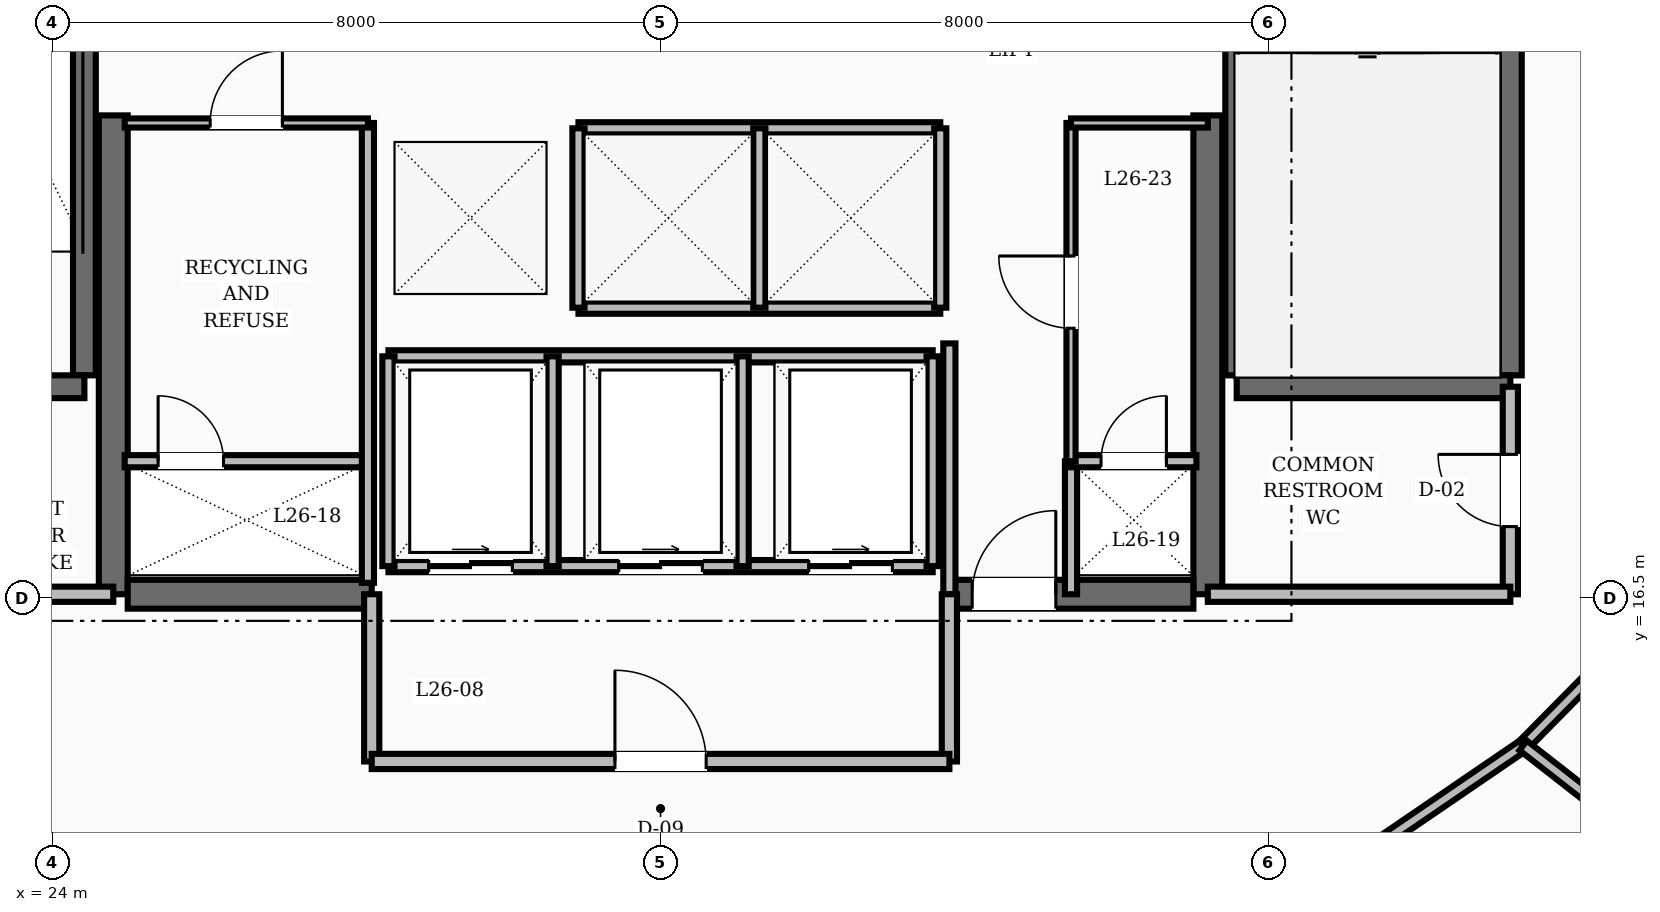
"""IFC4 building model, lengths in metres.
Left out: names, types, materials, properties, quantities, classifications, styles, units other than length and angle.
Written with IfcOpenShell. Run it as: python <this file> out.ifc"""

import sys

from ifc_helpers import new_model, si_unit, direction, frame, frame_2d, origin, place, context, subcontext, project, spatial, rectangle, extrude, element, fill, save


model = new_model("IFC4")
c1 = context("Model", 3, precision=1e-05, world=origin(), true_north=direction((0.0, 1.0)))
c2 = subcontext(c1, "Body", "Model", "MODEL_VIEW")
j1 = project(units=[si_unit("LENGTHUNIT", "METRE"), si_unit("PLANEANGLEUNIT", "RADIAN")], contexts=[c1])
p1 = place(None, origin())
s1 = spatial("IfcSite", under=j1, at=p1, CompositionType="ELEMENT")
p2 = place(p1, origin())
s2 = spatial("IfcBuilding", under=s1, at=p2, CompositionType="ELEMENT")
p3 = place(p2, frame((0.0, 0.0, 102.4)))
s3 = spatial("IfcBuildingStorey", under=s2, at=p3, CompositionType="ELEMENT", Elevation=102.4)
for number, where, z_axis, x_axis in (
    (1, (24.8, 16.55, 0.0), (0.0, 0.0, 1.0), (0.0, 1.0, 0.0)),
    (2, (39.2, 16.55, 0.0), (0.0, 0.0, 1.0), (0.0, 1.0, 0.0)),
):
    element("IfcWall", number, at=place(p3, frame(where, z_axis=z_axis, x_axis=x_axis)), inside=s3, PredefinedType="SHEAR", context=c2, shape_type="SweptSolid", body=[
        extrude(rectangle(XDim=6.3, YDim=0.38, at=frame_2d((3.15, 0.0))), origin(), (0.0, 0.0, 1.0), 3.6),
    ])
p4 = place(p3, frame((24.99, 16.55, 0.0), z_axis=(0.0, 0.0, 1.0), x_axis=(1.0, 0.0, 0.0)))
e3 = element("IfcWall", 3, at=p4, inside=s3, PredefinedType="SHEAR", context=c2, shape_type="SweptSolid", body=[
    extrude(rectangle(XDim=3.21, YDim=0.38, at=frame_2d((1.605, 0.0))), origin(), (0.0, 0.0, 1.0), 3.6),
])
p5 = place(p3, frame((35.8, 16.55, 0.0), z_axis=(0.0, 0.0, 1.0), x_axis=(1.0, 0.0, 0.0)))
e4 = element("IfcWall", 4, at=p5, inside=s3, PredefinedType="SHEAR", context=c2, shape_type="SweptSolid", body=[
    extrude(rectangle(XDim=3.21, YDim=0.38, at=frame_2d((1.605, 0.0))), origin(), (0.0, 0.0, 1.0), 3.6),
])
p6 = place(p5, frame((0.3, 0.0, 0.0)))
e5 = element("IfcOpeningElement", 5, at=p6, cuts=e4, PredefinedType="OPENING", context=c2, shape_type="SweptSolid", body=[
    extrude(rectangle(XDim=1.1, YDim=2.1, at=frame_2d((0.55, 1.05))), frame((0.0, 0.2, 0.0), z_axis=(0.0, -1.0, 0.0), x_axis=(1.0, 0.0, 0.0)), (0.0, 0.0, 1.0), 0.4),
])
p7 = place(p3, frame((24.42, 19.43, 0.0), z_axis=(0.0, 0.0, 1.0), x_axis=(0.0, 1.0, 0.0)))
e6 = element("IfcWall", 6, at=p7, inside=s3, PredefinedType="SHEAR", context=c2, shape_type="SweptSolid", body=[
    extrude(rectangle(XDim=8.74, YDim=0.3, at=frame_2d((4.37, 0.0))), origin(), (0.0, 0.0, 1.0), 3.6),
])
p8 = place(p3, frame((20.82, 19.28, 0.0), z_axis=(0.0, 0.0, 1.0), x_axis=(1.0, 0.0, 0.0)))
e7 = element("IfcWall", 7, at=p8, inside=s3, PredefinedType="SHEAR", context=c2, shape_type="SweptSolid", body=[
    extrude(rectangle(XDim=3.6, YDim=0.3, at=frame_2d((1.8, 0.0))), origin(), (0.0, 0.0, 1.0), 3.6),
])
p9 = place(p8, frame((1.3, 0.0, 0.0)))
e8 = element("IfcOpeningElement", 8, at=p9, cuts=e7, PredefinedType="OPENING", context=c2, shape_type="SweptSolid", body=[
    extrude(rectangle(XDim=1.1, YDim=2.1, at=frame_2d((0.55, 1.05))), frame((0.0, 0.16, 0.0), z_axis=(0.0, -1.0, 0.0), x_axis=(1.0, 0.0, 0.0)), (0.0, 0.0, 1.0), 0.32),
])
for number, where, z_axis, x_axis in (
    (9, (43.18, 19.43, 0.0), (0.0, 0.0, 1.0), (0.0, 1.0, 0.0)),
    (10, (39.58, 19.43, 0.0), (0.0, 0.0, 1.0), (0.0, 1.0, 0.0)),
):
    element("IfcWall", number, at=place(p3, frame(where, z_axis=z_axis, x_axis=x_axis)), inside=s3, PredefinedType="SHEAR", context=c2, shape_type="SweptSolid", body=[
        extrude(rectangle(XDim=8.74, YDim=0.3, at=frame_2d((4.37, 0.0))), origin(), (0.0, 0.0, 1.0), 3.6),
    ])
p10 = place(p3, frame((39.58, 19.28, 0.0), z_axis=(0.0, 0.0, 1.0), x_axis=(1.0, 0.0, 0.0)))
e11 = element("IfcWall", 11, at=p10, inside=s3, PredefinedType="SHEAR", context=c2, shape_type="SweptSolid", body=[
    extrude(rectangle(XDim=3.6, YDim=0.3, at=frame_2d((1.8, 0.0))), origin(), (0.0, 0.0, 1.0), 3.6),
])
p11 = place(p3, frame((20.82, 16.55, 0.0), z_axis=(0.0, 0.0, 1.0), x_axis=(1.0, 0.0, 0.0)))
e12 = element("IfcWall", 12, at=p11, inside=s3, PredefinedType="SOLIDWALL", context=c2, shape_type="SweptSolid", body=[
    extrude(rectangle(XDim=3.98, YDim=0.2, at=frame_2d((1.99, 0.0))), origin(), (0.0, 0.0, 1.0), 2.67),
])
p12 = place(p3, frame((43.18, 16.55, 0.0), z_axis=(0.0, 0.0, 1.0), x_axis=(0.0, 1.0, 0.0)))
e13 = element("IfcWall", 13, at=p12, inside=s3, PredefinedType="SOLIDWALL", context=c2, shape_type="SweptSolid", body=[
    extrude(rectangle(XDim=2.73, YDim=0.2, at=frame_2d((1.365, 0.0))), origin(), (0.0, 0.0, 1.0), 2.67),
])
p13 = place(p12, frame((0.89, 0.0, 0.0)))
e14 = element("IfcOpeningElement", 14, at=p13, cuts=e13, PredefinedType="OPENING", context=c2, shape_type="SweptSolid", body=[
    extrude(rectangle(XDim=0.95, YDim=2.1, at=frame_2d((0.475, 1.05))), frame((0.0, 0.11, 0.0), z_axis=(0.0, -1.0, 0.0), x_axis=(1.0, 0.0, 0.0)), (0.0, 0.0, 1.0), 0.22),
])
p14 = place(p3, frame((39.2, 16.55, 0.0), z_axis=(0.0, 0.0, 1.0), x_axis=(1.0, 0.0, 0.0)))
e15 = element("IfcWall", 15, at=p14, inside=s3, PredefinedType="SOLIDWALL", context=c2, shape_type="SweptSolid", body=[
    extrude(rectangle(XDim=3.98, YDim=0.2, at=frame_2d((1.99, 0.0))), origin(), (0.0, 0.0, 1.0), 2.67),
])
p15 = place(p3, frame((35.8, 16.55, 0.0), z_axis=(0.0, 0.0, 1.0), x_axis=(0.0, 1.0, 0.0)))
e16 = element("IfcWall", 16, at=p15, inside=s3, PredefinedType="SOLIDWALL", context=c2, shape_type="SweptSolid", body=[
    extrude(rectangle(XDim=3.3, YDim=0.16, at=frame_2d((1.65, 0.0))), origin(), (0.0, 0.0, 1.0), 2.67),
])
p16 = place(p3, frame((37.4, 16.55, 0.0), z_axis=(0.0, 0.0, 1.0), x_axis=(0.0, 1.0, 0.0)))
e17 = element("IfcWall", 17, at=p16, inside=s3, PredefinedType="SOLIDWALL", context=c2, shape_type="SweptSolid", body=[
    extrude(rectangle(XDim=1.75, YDim=0.16, at=frame_2d((0.875, 0.0))), origin(), (0.0, 0.0, 1.0), 2.67),
])
for number, where, z_axis, x_axis in (
    (18, (28.2, 14.35, 0.0), (0.0, 0.0, 1.0), (0.0, 1.0, 0.0)),
    (19, (35.8, 14.35, 0.0), (0.0, 0.0, 1.0), (0.0, 1.0, 0.0)),
):
    element("IfcWall", number, at=place(p3, frame(where, z_axis=z_axis, x_axis=x_axis)), inside=s3, PredefinedType="SOLIDWALL", context=c2, shape_type="SweptSolid", body=[
        extrude(rectangle(XDim=2.2, YDim=0.2, at=frame_2d((1.1, 0.0))), origin(), (0.0, 0.0, 1.0), 2.67),
    ])
p17 = place(p3, frame((28.2, 14.35, 0.0), z_axis=(0.0, 0.0, 1.0), x_axis=(1.0, 0.0, 0.0)))
e20 = element("IfcWall", 20, at=p17, inside=s3, PredefinedType="SOLIDWALL", context=c2, shape_type="SweptSolid", body=[
    extrude(rectangle(XDim=7.6, YDim=0.2, at=frame_2d((3.8, 0.0))), origin(), (0.0, 0.0, 1.0), 2.67),
])
p18 = place(p17, frame((3.2, 0.0, 0.0)))
e21 = element("IfcOpeningElement", 21, at=p18, cuts=e20, PredefinedType="OPENING", context=c2, shape_type="SweptSolid", body=[
    extrude(rectangle(XDim=1.2, YDim=2.1, at=frame_2d((0.6, 1.05))), frame((0.0, 0.11, 0.0), z_axis=(0.0, -1.0, 0.0), x_axis=(1.0, 0.0, 0.0)), (0.0, 0.0, 1.0), 0.22),
])
for number, where, z_axis, x_axis in (
    (22, (30.92, 22.68, 0.0), (0.0, 0.0, 1.0), (1.0, 0.0, 0.0)),
    (23, (30.92, 20.32, 0.0), (0.0, 0.0, 1.0), (1.0, 0.0, 0.0)),
):
    element("IfcWall", number, at=place(p3, frame(where, z_axis=z_axis, x_axis=x_axis)), inside=s3, PredefinedType="SOLIDWALL", context=c2, shape_type="SweptSolid", body=[
        extrude(rectangle(XDim=4.76, YDim=0.16, at=frame_2d((2.38, 0.0))), origin(), (0.0, 0.0, 1.0), 2.67),
    ])
for number, where, z_axis, x_axis in (
    (24, (30.92, 20.32, 0.0), (0.0, 0.0, 1.0), (0.0, 1.0, 0.0)),
    (25, (33.3, 20.32, 0.0), (0.0, 0.0, 1.0), (0.0, 1.0, 0.0)),
    (26, (35.68, 20.32, 0.0), (0.0, 0.0, 1.0), (0.0, 1.0, 0.0)),
):
    element("IfcWall", number, at=place(p3, frame(where, z_axis=z_axis, x_axis=x_axis)), inside=s3, PredefinedType="SOLIDWALL", context=c2, shape_type="SweptSolid", body=[
        extrude(rectangle(XDim=2.36, YDim=0.16, at=frame_2d((1.18, 0.0))), origin(), (0.0, 0.0, 1.0), 2.67),
    ])
p19 = place(p3, frame((28.42, 16.92, 0.0), z_axis=(0.0, 0.0, 1.0), x_axis=(1.0, 0.0, 0.0)))
e27 = element("IfcWall", 27, at=p19, inside=s3, PredefinedType="SOLIDWALL", context=c2, shape_type="SweptSolid", body=[
    extrude(rectangle(XDim=7.16, YDim=0.16, at=frame_2d((3.58, 0.0))), origin(), (0.0, 0.0, 1.0), 2.67),
])
p20 = place(p19, frame((0.53, 0.0, 0.0)))
e28 = element("IfcOpeningElement", 28, at=p20, cuts=e27, PredefinedType="OPENING", context=c2, shape_type="SweptSolid", body=[
    extrude(rectangle(XDim=1.1, YDim=2.15, at=frame_2d((0.55, 1.075))), frame((0.0, 0.09, 0.0), z_axis=(0.0, -1.0, 0.0), x_axis=(1.0, 0.0, 0.0)), (0.0, 0.0, 1.0), 0.18),
])
p21 = place(p19, frame((3.03, 0.0, 0.0)))
e29 = element("IfcOpeningElement", 29, at=p21, cuts=e27, PredefinedType="OPENING", context=c2, shape_type="SweptSolid", body=[
    extrude(rectangle(XDim=1.1, YDim=2.15, at=frame_2d((0.55, 1.075))), frame((0.0, 0.09, 0.0), z_axis=(0.0, -1.0, 0.0), x_axis=(1.0, 0.0, 0.0)), (0.0, 0.0, 1.0), 0.18),
])
p22 = place(p19, frame((5.53, 0.0, 0.0)))
e30 = element("IfcOpeningElement", 30, at=p22, cuts=e27, PredefinedType="OPENING", context=c2, shape_type="SweptSolid", body=[
    extrude(rectangle(XDim=1.1, YDim=2.15, at=frame_2d((0.55, 1.075))), frame((0.0, 0.09, 0.0), z_axis=(0.0, -1.0, 0.0), x_axis=(1.0, 0.0, 0.0)), (0.0, 0.0, 1.0), 0.18),
])
p23 = place(p3, frame((28.42, 19.68, 0.0), z_axis=(0.0, 0.0, 1.0), x_axis=(1.0, 0.0, 0.0)))
e31 = element("IfcWall", 31, at=p23, inside=s3, PredefinedType="SOLIDWALL", context=c2, shape_type="SweptSolid", body=[
    extrude(rectangle(XDim=7.16, YDim=0.16, at=frame_2d((3.58, 0.0))), origin(), (0.0, 0.0, 1.0), 2.67),
])
for number, where, z_axis, x_axis in (
    (32, (28.42, 16.92, 0.0), (0.0, 0.0, 1.0), (0.0, 1.0, 0.0)),
    (33, (30.58, 16.92, 0.0), (0.0, 0.0, 1.0), (0.0, 1.0, 0.0)),
    (34, (33.08, 16.92, 0.0), (0.0, 0.0, 1.0), (0.0, 1.0, 0.0)),
    (35, (35.58, 16.92, 0.0), (0.0, 0.0, 1.0), (0.0, 1.0, 0.0)),
):
    element("IfcWall", number, at=place(p3, frame(where, z_axis=z_axis, x_axis=x_axis)), inside=s3, PredefinedType="SOLIDWALL", context=c2, shape_type="SweptSolid", body=[
        extrude(rectangle(XDim=2.76, YDim=0.16, at=frame_2d((1.38, 0.0))), origin(), (0.0, 0.0, 1.0), 2.67),
    ])
p24 = place(p3, frame((24.95, 18.3, 0.0), z_axis=(0.0, 0.0, 1.0), x_axis=(1.0, 0.0, 0.0)))
e36 = element("IfcWall", 36, at=p24, inside=s3, PredefinedType="SOLIDWALL", context=c2, shape_type="SweptSolid", body=[
    extrude(rectangle(XDim=3.2, YDim=0.16, at=frame_2d((1.6, 0.0))), origin(), (0.0, 0.0, 1.0), 2.67),
])
p25 = place(p24, frame((0.44, 0.0, 0.0)))
e37 = element("IfcOpeningElement", 37, at=p25, cuts=e36, PredefinedType="OPENING", context=c2, shape_type="SweptSolid", body=[
    extrude(rectangle(XDim=0.86, YDim=2.05, at=frame_2d((0.43, 1.025))), frame((0.0, 0.09, 0.0), z_axis=(0.0, -1.0, 0.0), x_axis=(1.0, 0.0, 0.0)), (0.0, 0.0, 1.0), 0.18),
])
p26 = place(p3, frame((28.15, 16.7, 0.0), z_axis=(0.0, 0.0, 1.0), x_axis=(0.0, 1.0, 0.0)))
e38 = element("IfcWall", 38, at=p26, inside=s3, PredefinedType="SOLIDWALL", context=c2, shape_type="SweptSolid", body=[
    extrude(rectangle(XDim=6.05, YDim=0.16, at=frame_2d((3.025, 0.0))), origin(), (0.0, 0.0, 1.0), 2.67),
])
p27 = place(p3, frame((37.4, 18.3, 0.0), z_axis=(0.0, 0.0, 1.0), x_axis=(1.0, 0.0, 0.0)))
e39 = element("IfcWall", 39, at=p27, inside=s3, PredefinedType="SOLIDWALL", context=c2, shape_type="SweptSolid", body=[
    extrude(rectangle(XDim=1.65, YDim=0.16, at=frame_2d((0.825, 0.0))), origin(), (0.0, 0.0, 1.0), 2.67),
])
p28 = place(p27, frame((0.395, 0.0, 0.0)))
e40 = element("IfcOpeningElement", 40, at=p28, cuts=e39, PredefinedType="OPENING", context=c2, shape_type="SweptSolid", body=[
    extrude(rectangle(XDim=0.86, YDim=2.1, at=frame_2d((0.43, 1.05))), frame((0.0, 0.09, 0.0), z_axis=(0.0, -1.0, 0.0), x_axis=(1.0, 0.0, 0.0)), (0.0, 0.0, 1.0), 0.18),
])
p29 = place(p3, frame((24.95, 22.75, 0.0), z_axis=(0.0, 0.0, 1.0), x_axis=(1.0, 0.0, 0.0)))
e41 = element("IfcWall", 41, at=p29, inside=s3, PredefinedType="PARTITIONING", context=c2, shape_type="SweptSolid", body=[
    extrude(rectangle(XDim=3.2, YDim=0.12, at=frame_2d((1.6, 0.0))), origin(), (0.0, 0.0, 1.0), 2.67),
])
p30 = place(p29, frame((1.125, 0.0, 0.0)))
e42 = element("IfcOpeningElement", 42, at=p30, cuts=e41, PredefinedType="OPENING", context=c2, shape_type="SweptSolid", body=[
    extrude(rectangle(XDim=0.95, YDim=2.1, at=frame_2d((0.475, 1.05))), frame((0.0, 0.07, 0.0), z_axis=(0.0, -1.0, 0.0), x_axis=(1.0, 0.0, 0.0)), (0.0, 0.0, 1.0), 0.14),
])
p31 = place(p3, frame((37.4, 18.3, 0.0), z_axis=(0.0, 0.0, 1.0), x_axis=(0.0, 1.0, 0.0)))
e43 = element("IfcWall", 43, at=p31, inside=s3, PredefinedType="PARTITIONING", context=c2, shape_type="SweptSolid", body=[
    extrude(rectangle(XDim=4.45, YDim=0.12, at=frame_2d((2.225, 0.0))), origin(), (0.0, 0.0, 1.0), 2.67),
])
p32 = place(p31, frame((1.75, 0.0, 0.0)))
e44 = element("IfcOpeningElement", 44, at=p32, cuts=e43, PredefinedType="OPENING", context=c2, shape_type="SweptSolid", body=[
    extrude(rectangle(XDim=0.95, YDim=2.1, at=frame_2d((0.475, 1.05))), frame((0.0, 0.07, 0.0), z_axis=(0.0, -1.0, 0.0), x_axis=(1.0, 0.0, 0.0)), (0.0, 0.0, 1.0), 0.14),
])
p33 = place(p3, frame((37.4, 22.75, 0.0), z_axis=(0.0, 0.0, 1.0), x_axis=(1.0, 0.0, 0.0)))
e45 = element("IfcWall", 45, at=p33, inside=s3, PredefinedType="PARTITIONING", context=c2, shape_type="SweptSolid", body=[
    extrude(rectangle(XDim=1.8, YDim=0.12, at=frame_2d((0.9, 0.0))), origin(), (0.0, 0.0, 1.0), 2.67),
])
p34 = place(p3, frame((40.917, 12.9, 0.0), z_axis=(0.0, 0.0, 1.0), x_axis=(0.825929039072, 0.563774088104, 0.0)))
e46 = element("IfcWall", 46, at=p34, inside=s3, PredefinedType="SOLIDWALL", context=c2, shape_type="SweptSolid", body=[
    extrude(rectangle(XDim=2.945, YDim=0.16, at=frame_2d((1.472, 0.0))), origin(), (0.0, 0.0, 1.0), 2.67),
])
p35 = place(p3, frame((43.349, 14.56, 0.0), z_axis=(0.0, 0.0, 1.0), x_axis=(0.702366174226, 0.711815816981, 0.0)))
e47 = element("IfcWall", 47, at=p35, inside=s3, PredefinedType="SOLIDWALL", context=c2, shape_type="SweptSolid", body=[
    extrude(rectangle(XDim=2.842, YDim=0.16, at=frame_2d((1.421, 0.0))), origin(), (0.0, 0.0, 1.0), 2.67),
])
p36 = place(p3, frame((43.349, 14.56, 0.0), z_axis=(0.0, 0.0, 1.0), x_axis=(0.788161960412, -0.615467890438, 0.0)))
e48 = element("IfcWall", 48, at=p36, inside=s3, PredefinedType="SOLIDWALL", context=c2, shape_type="SweptSolid", body=[
    extrude(rectangle(XDim=9.145, YDim=0.16, at=frame_2d((4.573, 0.0))), origin(), (0.0, 0.0, 1.0), 2.67),
])
p37 = place(p13, origin())
e49 = element("IfcDoor", 49, at=p37, inside=s3, OperationType="SINGLE_SWING_RIGHT", PredefinedType="DOOR", context=c2, shape_type="SweptSolid", body=[
    extrude(rectangle(XDim=0.95, YDim=2.1, at=frame_2d((0.475, 1.05))), frame((0.0, 0.025, 0.0), z_axis=(0.0, -1.0, 0.0), x_axis=(1.0, 0.0, 0.0)), (0.0, 0.0, 1.0), 0.05),
])
fill(e14, e49)
p38 = place(p6, origin())
e50 = element("IfcDoor", 50, at=p38, inside=s3, OperationType="SINGLE_SWING_RIGHT", PredefinedType="DOOR", context=c2, shape_type="SweptSolid", body=[
    extrude(rectangle(XDim=1.1, YDim=2.1, at=frame_2d((0.55, 1.05))), frame((0.0, 0.025, 0.0), z_axis=(0.0, -1.0, 0.0), x_axis=(1.0, 0.0, 0.0)), (0.0, 0.0, 1.0), 0.05),
])
fill(e5, e50)
p39 = place(p18, origin())
e51 = element("IfcDoor", 51, at=p39, inside=s3, OperationType="SINGLE_SWING_LEFT", PredefinedType="DOOR", context=c2, shape_type="SweptSolid", body=[
    extrude(rectangle(XDim=1.2, YDim=2.1, at=frame_2d((0.6, 1.05))), frame((0.0, 0.025, 0.0), z_axis=(0.0, -1.0, 0.0), x_axis=(1.0, 0.0, 0.0)), (0.0, 0.0, 1.0), 0.05),
])
fill(e21, e51)
p40 = place(p20, origin())
e52 = element("IfcDoor", 52, at=p40, inside=s3, OperationType="SLIDING_TO_RIGHT", PredefinedType="DOOR", context=c2, shape_type="SweptSolid", body=[
    extrude(rectangle(XDim=1.1, YDim=2.15, at=frame_2d((0.55, 1.075))), frame((0.0, 0.025, 0.0), z_axis=(0.0, -1.0, 0.0), x_axis=(1.0, 0.0, 0.0)), (0.0, 0.0, 1.0), 0.05),
])
fill(e28, e52)
p41 = place(p21, origin())
e53 = element("IfcDoor", 53, at=p41, inside=s3, OperationType="SLIDING_TO_RIGHT", PredefinedType="DOOR", context=c2, shape_type="SweptSolid", body=[
    extrude(rectangle(XDim=1.1, YDim=2.15, at=frame_2d((0.55, 1.075))), frame((0.0, 0.025, 0.0), z_axis=(0.0, -1.0, 0.0), x_axis=(1.0, 0.0, 0.0)), (0.0, 0.0, 1.0), 0.05),
])
fill(e29, e53)
p42 = place(p22, origin())
e54 = element("IfcDoor", 54, at=p42, inside=s3, OperationType="SLIDING_TO_RIGHT", PredefinedType="DOOR", context=c2, shape_type="SweptSolid", body=[
    extrude(rectangle(XDim=1.1, YDim=2.15, at=frame_2d((0.55, 1.075))), frame((0.0, 0.025, 0.0), z_axis=(0.0, -1.0, 0.0), x_axis=(1.0, 0.0, 0.0)), (0.0, 0.0, 1.0), 0.05),
])
fill(e30, e54)
p43 = place(p25, origin())
e55 = element("IfcDoor", 55, at=p43, inside=s3, OperationType="SINGLE_SWING_LEFT", PredefinedType="TRAPDOOR", context=c2, shape_type="SweptSolid", body=[
    extrude(rectangle(XDim=0.86, YDim=2.05, at=frame_2d((0.43, 1.025))), frame((0.0, 0.025, 0.0), z_axis=(0.0, -1.0, 0.0), x_axis=(1.0, 0.0, 0.0)), (0.0, 0.0, 1.0), 0.05),
])
fill(e37, e55)
p44 = place(p28, origin())
e56 = element("IfcDoor", 56, at=p44, inside=s3, OperationType="SINGLE_SWING_RIGHT", PredefinedType="TRAPDOOR", context=c2, shape_type="SweptSolid", body=[
    extrude(rectangle(XDim=0.86, YDim=2.1, at=frame_2d((0.43, 1.05))), frame((0.0, 0.025, 0.0), z_axis=(0.0, -1.0, 0.0), x_axis=(1.0, 0.0, 0.0)), (0.0, 0.0, 1.0), 0.05),
])
fill(e40, e56)
p45 = place(p30, origin())
e57 = element("IfcDoor", 57, at=p45, inside=s3, OperationType="SINGLE_SWING_RIGHT", PredefinedType="DOOR", context=c2, shape_type="SweptSolid", body=[
    extrude(rectangle(XDim=0.95, YDim=2.1, at=frame_2d((0.475, 1.05))), frame((0.0, 0.025, 0.0), z_axis=(0.0, -1.0, 0.0), x_axis=(1.0, 0.0, 0.0)), (0.0, 0.0, 1.0), 0.05),
])
fill(e42, e57)
p46 = place(p32, origin())
e58 = element("IfcDoor", 58, at=p46, inside=s3, OperationType="SINGLE_SWING_RIGHT", PredefinedType="DOOR", context=c2, shape_type="SweptSolid", body=[
    extrude(rectangle(XDim=0.95, YDim=2.1, at=frame_2d((0.475, 1.05))), frame((0.0, 0.025, 0.0), z_axis=(0.0, -1.0, 0.0), x_axis=(1.0, 0.0, 0.0)), (0.0, 0.0, 1.0), 0.05),
])
fill(e44, e58)
save(model, sys.argv[1])
